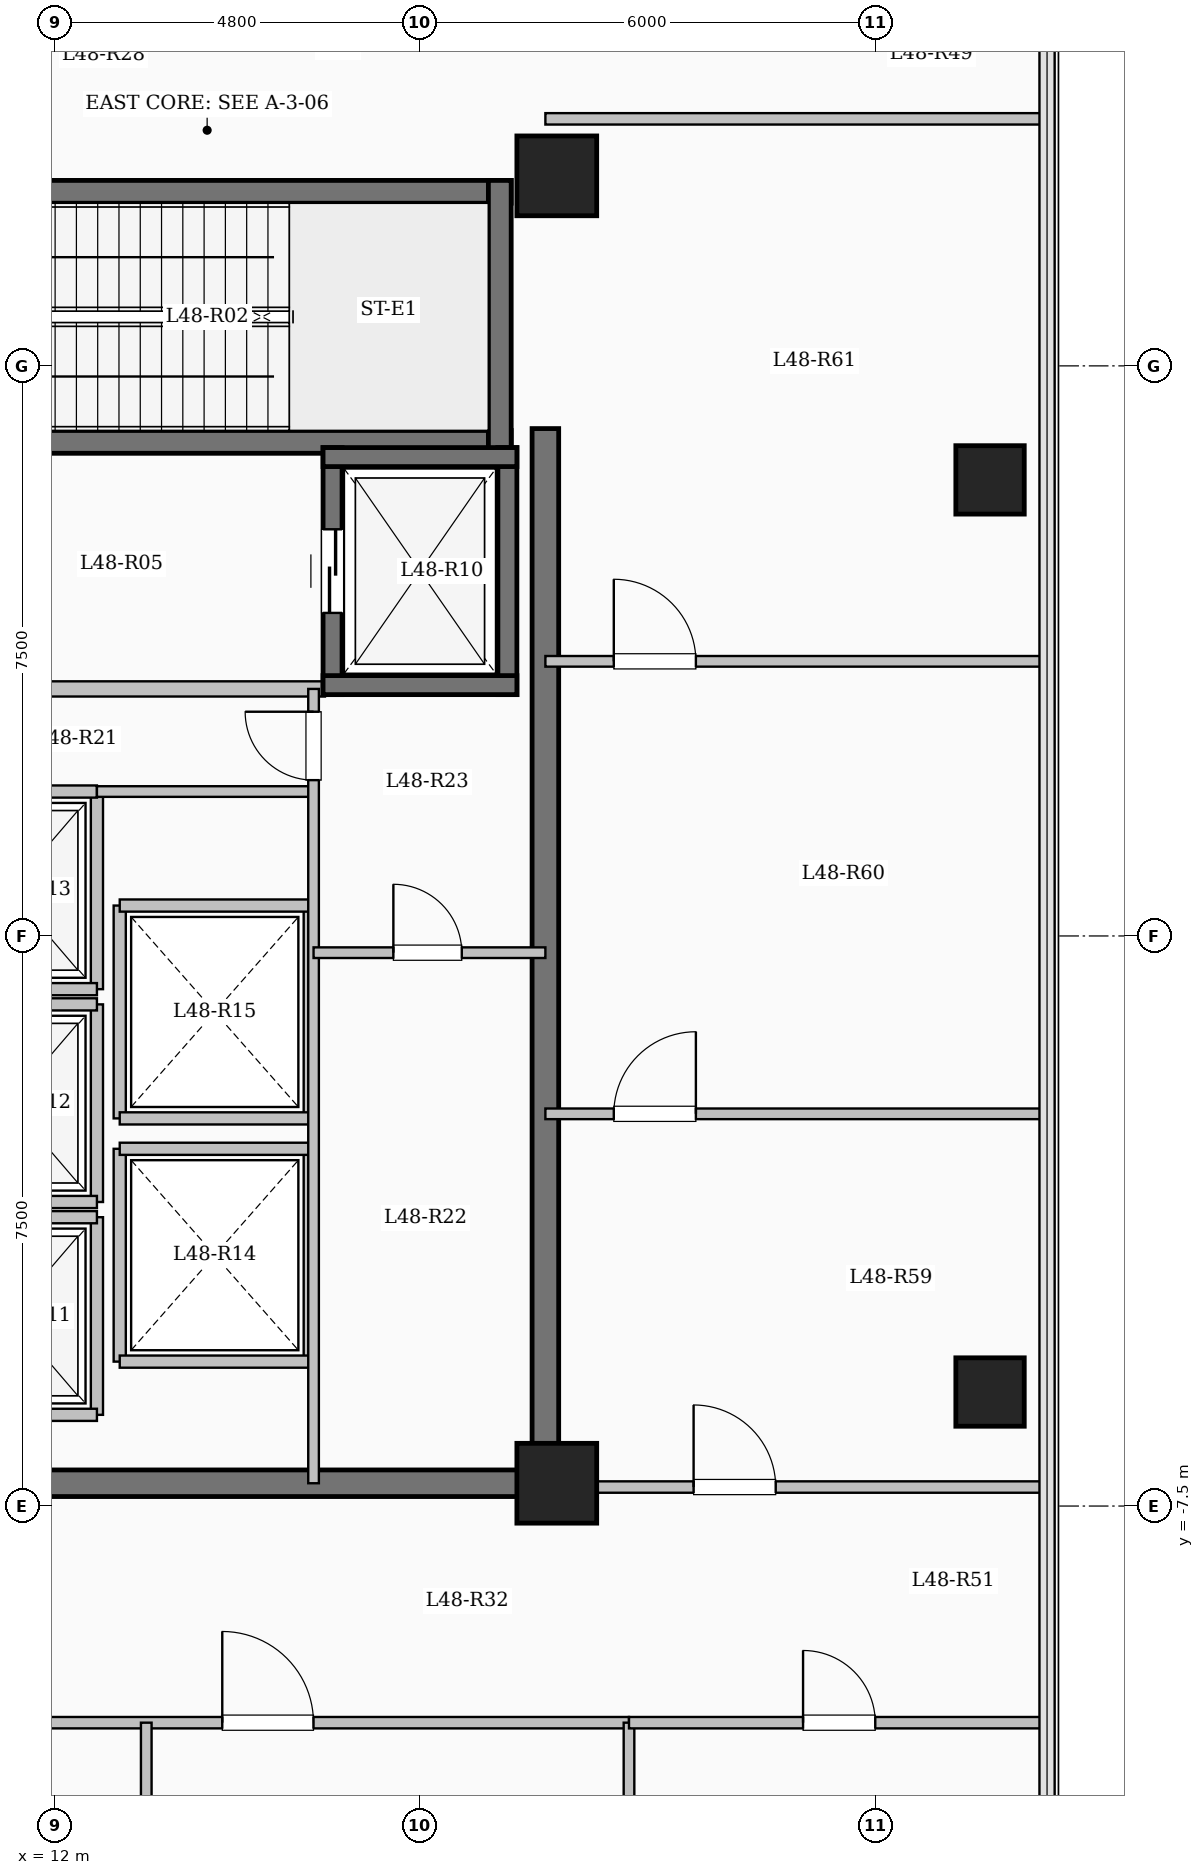
"""IFC4 building model, lengths in metres.
Left out: names, types, materials, properties, quantities, classifications, styles, units other than length and angle.
Written with IfcOpenShell. Run it as: python <this file> out.ifc"""

import sys

from ifc_helpers import new_model, si_unit, direction, frame, frame_2d, origin, origin_2d, place, context, subcontext, project, spatial, rectangle, extrude, element, fill, save


model = new_model("IFC4")
c1 = context("Model", 3, precision=1e-05, world=origin(), true_north=direction((0.0, 1.0)))
c2 = subcontext(c1, "Body", "Model", "MODEL_VIEW")
j1 = project(units=[si_unit("LENGTHUNIT", "METRE"), si_unit("PLANEANGLEUNIT", "RADIAN")], contexts=[c1])
p1 = place(None, origin())
s1 = spatial("IfcSite", under=j1, at=p1, CompositionType="ELEMENT")
p2 = place(p1, origin())
s2 = spatial("IfcBuilding", under=s1, at=p2, CompositionType="ELEMENT")
p3 = place(p2, frame((0.0, 0.0, 177.3)))
s3 = spatial("IfcBuildingStorey", under=s2, at=p3, CompositionType="ELEMENT", Elevation=177.3)
for number, where, z_axis, x_axis in (
    (1, (18.6, -7.2, 0.0), (0.0, 0.0, 1.0), (1.0, 0.0, 0.0)),
    (2, (18.6, 10.0, 0.0), (0.0, 0.0, 1.0), (1.0, 0.0, 0.0)),
):
    element("IfcColumn", number, at=place(p3, frame(where, z_axis=z_axis, x_axis=x_axis)), inside=s3, PredefinedType="COLUMN", context=c2, shape_type="SweptSolid", body=[
        extrude(rectangle(XDim=1.05, YDim=1.05, at=origin_2d()), origin(), (0.0, 0.0, 1.0), 4.5),
    ])
for number, where, z_axis, x_axis in (
    (3, (24.3, -6.0, 0.0), (0.0, 0.0, 1.0), (1.0, 0.0, 0.0)),
    (4, (24.3, 6.0, 0.0), (0.0, 0.0, 1.0), (1.0, 0.0, 0.0)),
):
    element("IfcColumn", number, at=place(p3, frame(where, z_axis=z_axis, x_axis=x_axis)), inside=s3, PredefinedType="COLUMN", context=c2, shape_type="SweptSolid", body=[
        extrude(rectangle(XDim=0.9, YDim=0.9, at=origin_2d()), origin(), (0.0, 0.0, 1.0), 4.5),
    ])
p4 = place(p3, frame((10.0, 9.79, 0.0), z_axis=(0.0, 0.0, 1.0), x_axis=(1.0, 0.0, 0.0)))
e5 = element("IfcWall", 5, at=p4, inside=s3, PredefinedType="SHEAR", context=c2, shape_type="SweptSolid", body=[
    extrude(rectangle(XDim=8.0, YDim=0.3, at=frame_2d((4.0, 0.0))), origin(), (0.0, 0.0, 1.0), 4.5),
])
p5 = place(p3, frame((10.0, 6.5, 0.0), z_axis=(0.0, 0.0, 1.0), x_axis=(1.0, 0.0, 0.0)))
e6 = element("IfcWall", 6, at=p5, inside=s3, PredefinedType="SHEAR", context=c2, shape_type="SweptSolid", body=[
    extrude(rectangle(XDim=8.0, YDim=0.3, at=frame_2d((4.0, 0.0))), origin(), (0.0, 0.0, 1.0), 4.5),
])
p6 = place(p5, frame((0.55, 0.0, 0.0)))
e7 = element("IfcOpeningElement", 7, at=p6, cuts=e6, PredefinedType="OPENING", context=c2, shape_type="SweptSolid", body=[
    extrude(rectangle(XDim=1.0, YDim=2.15, at=frame_2d((0.5, 1.075))), frame((0.0, 0.16, 0.0), z_axis=(0.0, -1.0, 0.0), x_axis=(1.0, 0.0, 0.0)), (0.0, 0.0, 1.0), 0.32),
])
p7 = place(p3, frame((17.85, 6.35, 0.0), z_axis=(0.0, 0.0, 1.0), x_axis=(0.0, 1.0, 0.0)))
e8 = element("IfcWall", 8, at=p7, inside=s3, PredefinedType="SHEAR", context=c2, shape_type="SweptSolid", body=[
    extrude(rectangle(XDim=3.59, YDim=0.3, at=frame_2d((1.795, 0.0))), origin(), (0.0, 0.0, 1.0), 4.5),
])
p8 = place(p3, frame((10.15, 3.25, 0.0), z_axis=(0.0, 0.0, 1.0), x_axis=(1.0, 0.0, 0.0)))
e9 = element("IfcWall", 9, at=p8, inside=s3, PredefinedType="SOLIDWALL", context=c2, shape_type="SweptSolid", body=[
    extrude(rectangle(XDim=5.4, YDim=0.2, at=frame_2d((2.7, 0.0))), origin(), (0.0, 0.0, 1.0), 4.2),
])
p9 = place(p3, frame((15.65, 3.175, 0.0), z_axis=(0.0, 0.0, 1.0), x_axis=(0.0, 1.0, 0.0)))
e10 = element("IfcWall", 10, at=p9, inside=s3, PredefinedType="SHEAR", context=c2, shape_type="SweptSolid", body=[
    extrude(rectangle(XDim=3.25, YDim=0.25, at=frame_2d((1.625, 0.0))), origin(), (0.0, 0.0, 1.0), 4.5),
])
p10 = place(p9, frame((1.075, 0.0, 0.0)))
e11 = element("IfcOpeningElement", 11, at=p10, cuts=e10, PredefinedType="OPENING", context=c2, shape_type="SweptSolid", body=[
    extrude(rectangle(XDim=1.1, YDim=2.15, at=frame_2d((0.55, 1.075))), frame((0.0, 0.135, 0.0), z_axis=(0.0, -1.0, 0.0), x_axis=(1.0, 0.0, 0.0)), (0.0, 0.0, 1.0), 0.27),
])
p11 = place(p3, frame((17.95, 3.175, 0.0), z_axis=(0.0, 0.0, 1.0), x_axis=(0.0, 1.0, 0.0)))
e12 = element("IfcWall", 12, at=p11, inside=s3, PredefinedType="SHEAR", context=c2, shape_type="SweptSolid", body=[
    extrude(rectangle(XDim=3.25, YDim=0.25, at=frame_2d((1.625, 0.0))), origin(), (0.0, 0.0, 1.0), 4.5),
])
for number, where, z_axis, x_axis in (
    (13, (15.525, 3.3, 0.0), (0.0, 0.0, 1.0), (1.0, 0.0, 0.0)),
    (14, (15.525, 6.3, 0.0), (0.0, 0.0, 1.0), (1.0, 0.0, 0.0)),
):
    element("IfcWall", number, at=place(p3, frame(where, z_axis=z_axis, x_axis=x_axis)), inside=s3, PredefinedType="SHEAR", context=c2, shape_type="SweptSolid", body=[
        extrude(rectangle(XDim=2.55, YDim=0.25, at=frame_2d((1.275, 0.0))), origin(), (0.0, 0.0, 1.0), 4.5),
    ])
p12 = place(p3, frame((12.55, -6.3, 0.0), z_axis=(0.0, 0.0, 1.0), x_axis=(0.0, 1.0, 0.0)))
e15 = element("IfcWall", 15, at=p12, inside=s3, PredefinedType="SOLIDWALL", context=c2, shape_type="SweptSolid", body=[
    extrude(rectangle(XDim=2.6, YDim=0.16, at=frame_2d((1.3, 0.0))), origin(), (0.0, 0.0, 1.0), 4.2),
])
for number, where, z_axis, x_axis in (
    (16, (10.25, -6.3, 0.0), (0.0, 0.0, 1.0), (1.0, 0.0, 0.0)),
    (17, (10.25, -3.7, 0.0), (0.0, 0.0, 1.0), (1.0, 0.0, 0.0)),
):
    element("IfcWall", number, at=place(p3, frame(where, z_axis=z_axis, x_axis=x_axis)), inside=s3, PredefinedType="SOLIDWALL", context=c2, shape_type="SweptSolid", body=[
        extrude(rectangle(XDim=2.3, YDim=0.16, at=frame_2d((1.15, 0.0))), origin(), (0.0, 0.0, 1.0), 4.2),
    ])
p13 = place(p3, frame((12.55, -3.5, 0.0), z_axis=(0.0, 0.0, 1.0), x_axis=(0.0, 1.0, 0.0)))
e18 = element("IfcWall", 18, at=p13, inside=s3, PredefinedType="SOLIDWALL", context=c2, shape_type="SweptSolid", body=[
    extrude(rectangle(XDim=2.6, YDim=0.16, at=frame_2d((1.3, 0.0))), origin(), (0.0, 0.0, 1.0), 4.2),
])
for number, where, z_axis, x_axis in (
    (19, (10.25, -3.5, 0.0), (0.0, 0.0, 1.0), (1.0, 0.0, 0.0)),
    (20, (10.25, -0.9, 0.0), (0.0, 0.0, 1.0), (1.0, 0.0, 0.0)),
):
    element("IfcWall", number, at=place(p3, frame(where, z_axis=z_axis, x_axis=x_axis)), inside=s3, PredefinedType="SOLIDWALL", context=c2, shape_type="SweptSolid", body=[
        extrude(rectangle(XDim=2.3, YDim=0.16, at=frame_2d((1.15, 0.0))), origin(), (0.0, 0.0, 1.0), 4.2),
    ])
p14 = place(p3, frame((12.55, -0.7, 0.0), z_axis=(0.0, 0.0, 1.0), x_axis=(0.0, 1.0, 0.0)))
e21 = element("IfcWall", 21, at=p14, inside=s3, PredefinedType="SOLIDWALL", context=c2, shape_type="SweptSolid", body=[
    extrude(rectangle(XDim=2.6, YDim=0.16, at=frame_2d((1.3, 0.0))), origin(), (0.0, 0.0, 1.0), 4.2),
])
for number, where, z_axis, x_axis in (
    (22, (10.25, -0.7, 0.0), (0.0, 0.0, 1.0), (1.0, 0.0, 0.0)),
    (23, (10.25, 1.9, 0.0), (0.0, 0.0, 1.0), (1.0, 0.0, 0.0)),
):
    element("IfcWall", number, at=place(p3, frame(where, z_axis=z_axis, x_axis=x_axis)), inside=s3, PredefinedType="SOLIDWALL", context=c2, shape_type="SweptSolid", body=[
        extrude(rectangle(XDim=2.3, YDim=0.16, at=frame_2d((1.15, 0.0))), origin(), (0.0, 0.0, 1.0), 4.2),
    ])
for number, where, z_axis, x_axis in (
    (24, (12.85, -5.6, 0.0), (0.0, 0.0, 1.0), (0.0, 1.0, 0.0)),
    (25, (15.35, -5.6, 0.0), (0.0, 0.0, 1.0), (0.0, 1.0, 0.0)),
):
    element("IfcWall", number, at=place(p3, frame(where, z_axis=z_axis, x_axis=x_axis)), inside=s3, PredefinedType="SOLIDWALL", context=c2, shape_type="SweptSolid", body=[
        extrude(rectangle(XDim=2.8, YDim=0.16, at=frame_2d((1.4, 0.0))), origin(), (0.0, 0.0, 1.0), 4.2),
    ])
for number, where, z_axis, x_axis in (
    (26, (12.85, -5.6, 0.0), (0.0, 0.0, 1.0), (1.0, 0.0, 0.0)),
    (27, (12.85, -2.8, 0.0), (0.0, 0.0, 1.0), (1.0, 0.0, 0.0)),
):
    element("IfcWall", number, at=place(p3, frame(where, z_axis=z_axis, x_axis=x_axis)), inside=s3, PredefinedType="SOLIDWALL", context=c2, shape_type="SweptSolid", body=[
        extrude(rectangle(XDim=2.5, YDim=0.16, at=frame_2d((1.25, 0.0))), origin(), (0.0, 0.0, 1.0), 4.2),
    ])
for number, where, z_axis, x_axis in (
    (28, (12.85, -2.4, 0.0), (0.0, 0.0, 1.0), (0.0, 1.0, 0.0)),
    (29, (15.35, -2.4, 0.0), (0.0, 0.0, 1.0), (0.0, 1.0, 0.0)),
):
    element("IfcWall", number, at=place(p3, frame(where, z_axis=z_axis, x_axis=x_axis)), inside=s3, PredefinedType="SOLIDWALL", context=c2, shape_type="SweptSolid", body=[
        extrude(rectangle(XDim=2.8, YDim=0.16, at=frame_2d((1.4, 0.0))), origin(), (0.0, 0.0, 1.0), 4.2),
    ])
for number, where, z_axis, x_axis in (
    (30, (12.85, -2.4, 0.0), (0.0, 0.0, 1.0), (1.0, 0.0, 0.0)),
    (31, (12.85, 0.4, 0.0), (0.0, 0.0, 1.0), (1.0, 0.0, 0.0)),
):
    element("IfcWall", number, at=place(p3, frame(where, z_axis=z_axis, x_axis=x_axis)), inside=s3, PredefinedType="SOLIDWALL", context=c2, shape_type="SweptSolid", body=[
        extrude(rectangle(XDim=2.5, YDim=0.16, at=frame_2d((1.25, 0.0))), origin(), (0.0, 0.0, 1.0), 4.2),
    ])
p15 = place(p3, frame((18.45, -7.375, 0.0), z_axis=(0.0, 0.0, 1.0), x_axis=(0.0, 1.0, 0.0)))
e32 = element("IfcWall", 32, at=p15, inside=s3, PredefinedType="SHEAR", context=c2, shape_type="SweptSolid", body=[
    extrude(rectangle(XDim=14.05, YDim=0.35, at=frame_2d((7.025, 0.0))), origin(), (0.0, 0.0, 1.0), 4.5),
])
p16 = place(p3, frame((10.075, -7.2, 0.0), z_axis=(0.0, 0.0, 1.0), x_axis=(1.0, 0.0, 0.0)))
e33 = element("IfcWall", 33, at=p16, inside=s3, PredefinedType="SHEAR", context=c2, shape_type="SweptSolid", body=[
    extrude(rectangle(XDim=8.55, YDim=0.35, at=frame_2d((4.275, 0.0))), origin(), (0.0, 0.0, 1.0), 4.5),
])
p17 = place(p3, frame((12.55, 1.9, 0.0), z_axis=(0.0, 0.0, 1.0), x_axis=(1.0, 0.0, 0.0)))
e34 = element("IfcWall", 34, at=p17, inside=s3, PredefinedType="PARTITIONING", context=c2, shape_type="SweptSolid", body=[
    extrude(rectangle(XDim=2.85, YDim=0.14, at=frame_2d((1.425, 0.0))), origin(), (0.0, 0.0, 1.0), 4.2),
])
p18 = place(p3, frame((15.4, -7.2, 0.0), z_axis=(0.0, 0.0, 1.0), x_axis=(0.0, 1.0, 0.0)))
e35 = element("IfcWall", 35, at=p18, inside=s3, PredefinedType="PARTITIONING", context=c2, shape_type="SweptSolid", body=[
    extrude(rectangle(XDim=10.45, YDim=0.14, at=frame_2d((5.225, 0.0))), origin(), (0.0, 0.0, 1.0), 4.2),
])
p19 = place(p18, frame((9.25, 0.0, 0.0)))
e36 = element("IfcOpeningElement", 36, at=p19, cuts=e35, PredefinedType="OPENING", context=c2, shape_type="SweptSolid", body=[
    extrude(rectangle(XDim=0.9, YDim=2.08, at=frame_2d((0.45, 1.04))), frame((0.0, 0.08, 0.0), z_axis=(0.0, -1.0, 0.0), x_axis=(1.0, 0.0, 0.0)), (0.0, 0.0, 1.0), 0.16),
])
p20 = place(p3, frame((15.4, -0.22, 0.0), z_axis=(0.0, 0.0, 1.0), x_axis=(1.0, 0.0, 0.0)))
e37 = element("IfcWall", 37, at=p20, inside=s3, PredefinedType="PARTITIONING", context=c2, shape_type="SweptSolid", body=[
    extrude(rectangle(XDim=3.05, YDim=0.14, at=frame_2d((1.525, 0.0))), origin(), (0.0, 0.0, 1.0), 4.2),
])
p21 = place(p20, frame((1.05, 0.0, 0.0)))
e38 = element("IfcOpeningElement", 38, at=p21, cuts=e37, PredefinedType="OPENING", context=c2, shape_type="SweptSolid", body=[
    extrude(rectangle(XDim=0.9, YDim=2.08, at=frame_2d((0.45, 1.04))), frame((0.0, 0.08, 0.0), z_axis=(0.0, -1.0, 0.0), x_axis=(1.0, 0.0, 0.0)), (0.0, 0.0, 1.0), 0.16),
])
p22 = place(p3, frame((8.55, -10.35, 0.0), z_axis=(0.0, 0.0, 1.0), x_axis=(1.0, 0.0, 0.0)))
e39 = element("IfcWall", 39, at=p22, inside=s3, PredefinedType="PARTITIONING", context=c2, shape_type="SweptSolid", body=[
    extrude(rectangle(XDim=11.0, YDim=0.15, at=frame_2d((5.5, 0.0))), origin(), (0.0, 0.0, 1.0), 4.2),
])
p23 = place(p22, frame((1.1, 0.0, 0.0)))
e40 = element("IfcOpeningElement", 40, at=p23, cuts=e39, PredefinedType="OPENING", context=c2, shape_type="SweptSolid", body=[
    extrude(rectangle(XDim=1.08, YDim=2.15, at=frame_2d((0.54, 1.075))), frame((0.0, 0.085, 0.0), z_axis=(0.0, -1.0, 0.0), x_axis=(1.0, 0.0, 0.0)), (0.0, 0.0, 1.0), 0.17),
])
p24 = place(p22, frame((5.649, 0.0, 0.0)))
e41 = element("IfcOpeningElement", 41, at=p24, cuts=e39, PredefinedType="OPENING", context=c2, shape_type="SweptSolid", body=[
    extrude(rectangle(XDim=1.2, YDim=2.15, at=frame_2d((0.6, 1.075))), frame((0.0, 0.085, 0.0), z_axis=(0.0, -1.0, 0.0), x_axis=(1.0, 0.0, 0.0)), (0.0, 0.0, 1.0), 0.17),
])
p25 = place(p3, frame((13.199, -21.2, 0.0), z_axis=(0.0, 0.0, 1.0), x_axis=(0.0, 1.0, 0.0)))
e42 = element("IfcWall", 42, at=p25, inside=s3, PredefinedType="PARTITIONING", context=c2, shape_type="SweptSolid", body=[
    extrude(rectangle(XDim=10.85, YDim=0.14, at=frame_2d((5.425, 0.0))), origin(), (0.0, 0.0, 1.0), 4.2),
])
p26 = place(p3, frame((18.45, -7.25, 0.0), z_axis=(0.0, 0.0, 1.0), x_axis=(1.0, 0.0, 0.0)))
e43 = element("IfcWall", 43, at=p26, inside=s3, PredefinedType="PARTITIONING", context=c2, shape_type="SweptSolid", body=[
    extrude(rectangle(XDim=6.63, YDim=0.15, at=frame_2d((3.315, 0.0))), origin(), (0.0, 0.0, 1.0), 4.2),
])
p27 = place(p26, frame((1.95, 0.0, 0.0)))
e44 = element("IfcOpeningElement", 44, at=p27, cuts=e43, PredefinedType="OPENING", context=c2, shape_type="SweptSolid", body=[
    extrude(rectangle(XDim=1.08, YDim=2.15, at=frame_2d((0.54, 1.075))), frame((0.0, 0.085, 0.0), z_axis=(0.0, -1.0, 0.0), x_axis=(1.0, 0.0, 0.0)), (0.0, 0.0, 1.0), 0.17),
])
p28 = place(p3, frame((18.45, 10.75, 0.0), z_axis=(0.0, 0.0, 1.0), x_axis=(1.0, 0.0, 0.0)))
e45 = element("IfcWall", 45, at=p28, inside=s3, PredefinedType="PARTITIONING", context=c2, shape_type="SweptSolid", body=[
    extrude(rectangle(XDim=6.63, YDim=0.15, at=frame_2d((3.315, 0.0))), origin(), (0.0, 0.0, 1.0), 4.2),
])
p29 = place(p3, frame((19.55, -17.25, 0.0), z_axis=(0.0, 0.0, 1.0), x_axis=(0.0, 1.0, 0.0)))
e46 = element("IfcWall", 46, at=p29, inside=s3, PredefinedType="PARTITIONING", context=c2, shape_type="SweptSolid", body=[
    extrude(rectangle(XDim=6.9, YDim=0.14, at=frame_2d((3.45, 0.0))), origin(), (0.0, 0.0, 1.0), 4.2),
])
p30 = place(p3, frame((19.55, -10.35, 0.0), z_axis=(0.0, 0.0, 1.0), x_axis=(1.0, 0.0, 0.0)))
e47 = element("IfcWall", 47, at=p30, inside=s3, PredefinedType="PARTITIONING", context=c2, shape_type="SweptSolid", body=[
    extrude(rectangle(XDim=5.53, YDim=0.15, at=frame_2d((2.765, 0.0))), origin(), (0.0, 0.0, 1.0), 4.2),
])
p31 = place(p30, frame((2.29, 0.0, 0.0)))
e48 = element("IfcOpeningElement", 48, at=p31, cuts=e47, PredefinedType="OPENING", context=c2, shape_type="SweptSolid", body=[
    extrude(rectangle(XDim=0.95, YDim=2.15, at=frame_2d((0.475, 1.075))), frame((0.0, 0.085, 0.0), z_axis=(0.0, -1.0, 0.0), x_axis=(1.0, 0.0, 0.0)), (0.0, 0.0, 1.0), 0.17),
])
p32 = place(p3, frame((18.45, -2.34, 0.0), z_axis=(0.0, 0.0, 1.0), x_axis=(1.0, 0.0, 0.0)))
e49 = element("IfcWall", 49, at=p32, inside=s3, PredefinedType="PARTITIONING", context=c2, shape_type="SweptSolid", body=[
    extrude(rectangle(XDim=6.63, YDim=0.14, at=frame_2d((3.315, 0.0))), origin(), (0.0, 0.0, 1.0), 4.2),
])
p33 = place(p32, frame((0.9, 0.0, 0.0)))
e50 = element("IfcOpeningElement", 50, at=p33, cuts=e49, PredefinedType="OPENING", context=c2, shape_type="SweptSolid", body=[
    extrude(rectangle(XDim=1.08, YDim=2.15, at=frame_2d((0.54, 1.075))), frame((0.0, 0.08, 0.0), z_axis=(0.0, -1.0, 0.0), x_axis=(1.0, 0.0, 0.0)), (0.0, 0.0, 1.0), 0.16),
])
p34 = place(p3, frame((18.45, 3.613, 0.0), z_axis=(0.0, 0.0, 1.0), x_axis=(1.0, 0.0, 0.0)))
e51 = element("IfcWall", 51, at=p34, inside=s3, PredefinedType="PARTITIONING", context=c2, shape_type="SweptSolid", body=[
    extrude(rectangle(XDim=6.63, YDim=0.14, at=frame_2d((3.315, 0.0))), origin(), (0.0, 0.0, 1.0), 4.2),
])
p35 = place(p34, frame((0.9, 0.0, 0.0)))
e52 = element("IfcOpeningElement", 52, at=p35, cuts=e51, PredefinedType="OPENING", context=c2, shape_type="SweptSolid", body=[
    extrude(rectangle(XDim=1.08, YDim=2.15, at=frame_2d((0.54, 1.075))), frame((0.0, 0.08, 0.0), z_axis=(0.0, -1.0, 0.0), x_axis=(1.0, 0.0, 0.0)), (0.0, 0.0, 1.0), 0.16),
])
p36 = place(p10, origin())
e53 = element("IfcDoor", 53, at=p36, inside=s3, OperationType="SLIDING_TO_LEFT", PredefinedType="DOOR", context=c2, shape_type="SweptSolid", body=[
    extrude(rectangle(XDim=1.1, YDim=2.15, at=frame_2d((0.55, 1.075))), frame((0.0, 0.025, 0.0), z_axis=(0.0, -1.0, 0.0), x_axis=(1.0, 0.0, 0.0)), (0.0, 0.0, 1.0), 0.05),
])
fill(e11, e53)
p37 = place(p19, origin())
e54 = element("IfcDoor", 54, at=p37, inside=s3, OperationType="SINGLE_SWING_RIGHT", PredefinedType="DOOR", context=c2, shape_type="SweptSolid", body=[
    extrude(rectangle(XDim=0.9, YDim=2.08, at=frame_2d((0.45, 1.04))), frame((0.0, 0.025, 0.0), z_axis=(0.0, -1.0, 0.0), x_axis=(1.0, 0.0, 0.0)), (0.0, 0.0, 1.0), 0.05),
])
fill(e36, e54)
p38 = place(p21, origin())
e55 = element("IfcDoor", 55, at=p38, inside=s3, OperationType="SINGLE_SWING_LEFT", PredefinedType="DOOR", context=c2, shape_type="SweptSolid", body=[
    extrude(rectangle(XDim=0.9, YDim=2.08, at=frame_2d((0.45, 1.04))), frame((0.0, 0.025, 0.0), z_axis=(0.0, -1.0, 0.0), x_axis=(1.0, 0.0, 0.0)), (0.0, 0.0, 1.0), 0.05),
])
fill(e38, e55)
p39 = place(p24, origin())
e56 = element("IfcDoor", 56, at=p39, inside=s3, OperationType="SINGLE_SWING_LEFT", PredefinedType="DOOR", context=c2, shape_type="SweptSolid", body=[
    extrude(rectangle(XDim=1.2, YDim=2.15, at=frame_2d((0.6, 1.075))), frame((0.0, 0.025, 0.0), z_axis=(0.0, -1.0, 0.0), x_axis=(1.0, 0.0, 0.0)), (0.0, 0.0, 1.0), 0.05),
])
fill(e41, e56)
p40 = place(p31, origin())
e57 = element("IfcDoor", 57, at=p40, inside=s3, OperationType="SINGLE_SWING_LEFT", PredefinedType="DOOR", context=c2, shape_type="SweptSolid", body=[
    extrude(rectangle(XDim=0.95, YDim=2.15, at=frame_2d((0.475, 1.075))), frame((0.0, 0.025, 0.0), z_axis=(0.0, -1.0, 0.0), x_axis=(1.0, 0.0, 0.0)), (0.0, 0.0, 1.0), 0.05),
])
fill(e48, e57)
p41 = place(p27, origin())
e58 = element("IfcDoor", 58, at=p41, inside=s3, OperationType="SINGLE_SWING_LEFT", PredefinedType="DOOR", context=c2, shape_type="SweptSolid", body=[
    extrude(rectangle(XDim=1.08, YDim=2.15, at=frame_2d((0.54, 1.075))), frame((0.0, 0.025, 0.0), z_axis=(0.0, -1.0, 0.0), x_axis=(1.0, 0.0, 0.0)), (0.0, 0.0, 1.0), 0.05),
])
fill(e44, e58)
p42 = place(p33, origin())
e59 = element("IfcDoor", 59, at=p42, inside=s3, OperationType="SINGLE_SWING_RIGHT", PredefinedType="DOOR", context=c2, shape_type="SweptSolid", body=[
    extrude(rectangle(XDim=1.08, YDim=2.15, at=frame_2d((0.54, 1.075))), frame((0.0, 0.025, 0.0), z_axis=(0.0, -1.0, 0.0), x_axis=(1.0, 0.0, 0.0)), (0.0, 0.0, 1.0), 0.05),
])
fill(e50, e59)
p43 = place(p35, origin())
e60 = element("IfcDoor", 60, at=p43, inside=s3, OperationType="SINGLE_SWING_LEFT", PredefinedType="DOOR", context=c2, shape_type="SweptSolid", body=[
    extrude(rectangle(XDim=1.08, YDim=2.15, at=frame_2d((0.54, 1.075))), frame((0.0, 0.025, 0.0), z_axis=(0.0, -1.0, 0.0), x_axis=(1.0, 0.0, 0.0)), (0.0, 0.0, 1.0), 0.05),
])
fill(e52, e60)
save(model, sys.argv[1])
